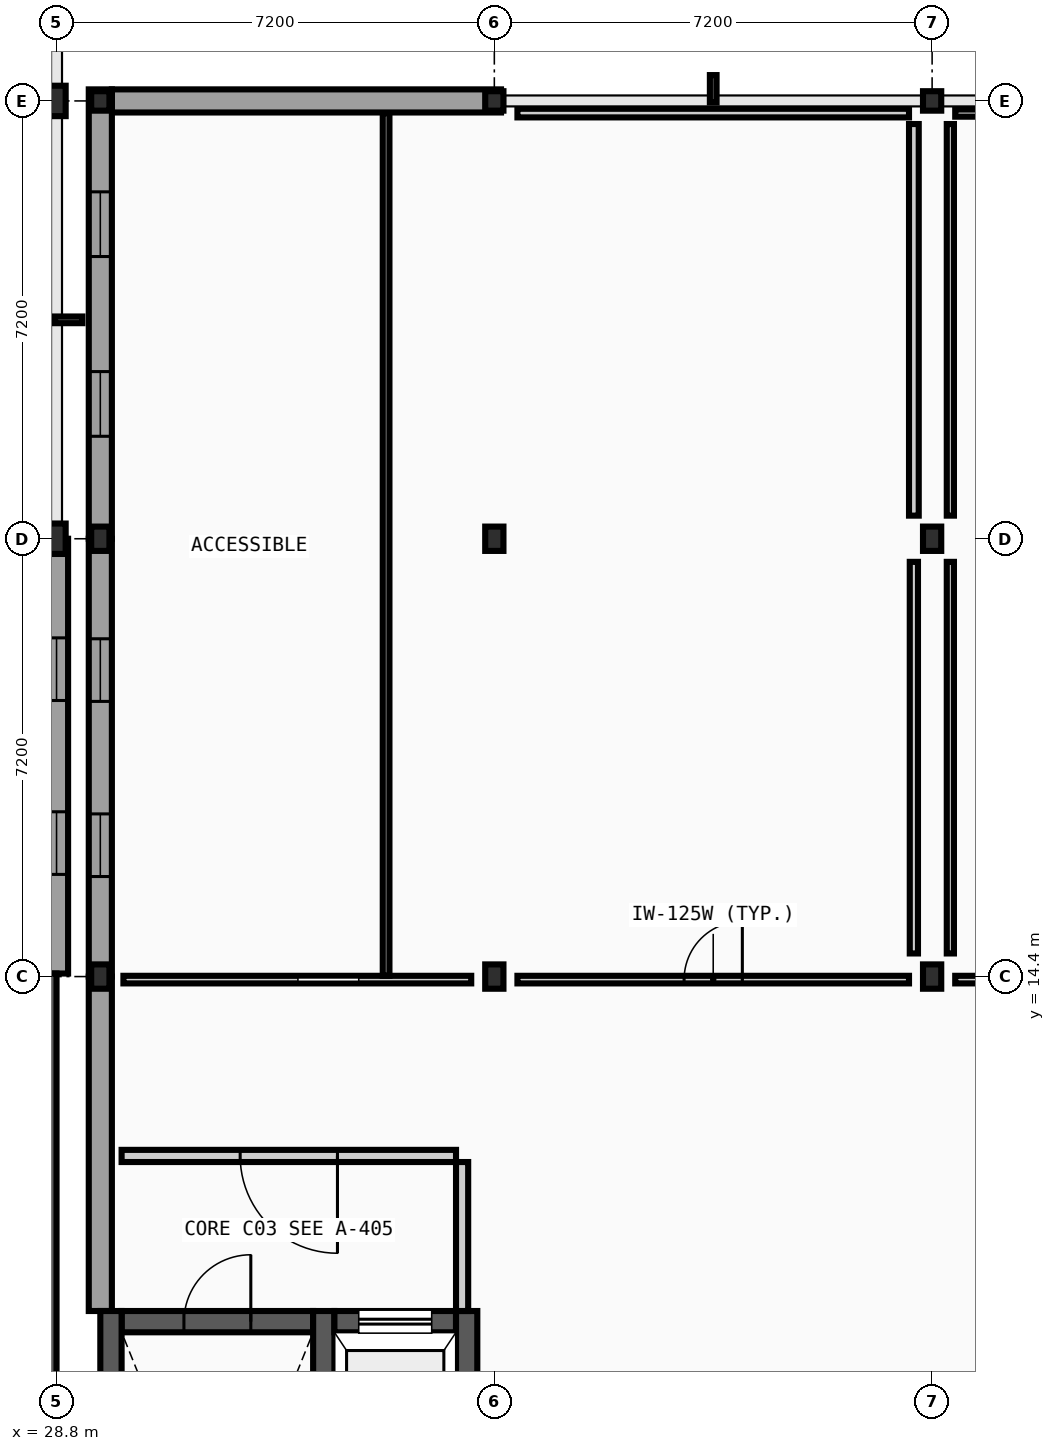
"""IFC4 building model, lengths in metres.
Left out: names, types, materials, properties, quantities, classifications, styles, units other than length and angle.
Written with IfcOpenShell. Run it as: python <this file> out.ifc"""

import sys

from ifc_helpers import new_model, si_unit, direction, frame, frame_2d, origin, origin_2d, place, context, subcontext, project, spatial, rectangle, i_section, extrude, element, fill, save


model = new_model("IFC4")
c1 = context("Model", 3, precision=1e-05, world=origin(), true_north=direction((0.0, 1.0)))
c2 = subcontext(c1, "Body", "Model", "MODEL_VIEW")
j1 = project(units=[si_unit("LENGTHUNIT", "METRE"), si_unit("PLANEANGLEUNIT", "RADIAN")], contexts=[c1])
p1 = place(None, origin())
s1 = spatial("IfcSite", under=j1, at=p1, CompositionType="ELEMENT")
p2 = place(p1, origin())
s2 = spatial("IfcBuilding", under=s1, at=p2, CompositionType="ELEMENT")
p3 = place(p2, frame((0.0, 0.0, 5.2)))
s3 = spatial("IfcBuildingStorey", under=s2, at=p3, CompositionType="ELEMENT", Elevation=5.2)
for number, where, z_axis, x_axis in (
    (1, (28.8, 21.6, 0.0), (0.0, 0.0, 1.0), (1.0, 0.0, 0.0)),
    (2, (28.8, 28.8, 0.0), (0.0, 0.0, 1.0), (1.0, 0.0, 0.0)),
):
    element("IfcColumn", number, at=place(p3, frame(where, z_axis=z_axis, x_axis=x_axis)), inside=s3, PredefinedType="COLUMN", context=c2, shape_type="SweptSolid", body=[
        extrude(i_section(OverallWidth=0.3, OverallDepth=0.5, WebThickness=0.014, FlangeThickness=0.028, FilletRadius=0.027, at=origin_2d()), origin(), (0.0, 0.0, 1.0), 4.4),
    ])
for number, where, z_axis, x_axis in (
    (3, (29.52, 14.4, 0.0), (0.0, 0.0, 1.0), (1.0, 0.0, 0.0)),
    (4, (29.52, 21.6, 0.0), (0.0, 0.0, 1.0), (1.0, 0.0, 0.0)),
):
    element("IfcColumn", number, at=place(p3, frame(where, z_axis=z_axis, x_axis=x_axis)), inside=s3, PredefinedType="COLUMN", context=c2, shape_type="SweptSolid", body=[
        extrude(i_section(OverallWidth=0.3, OverallDepth=0.4, WebThickness=0.013, FlangeThickness=0.024, FilletRadius=0.027, at=origin_2d()), origin(), (0.0, 0.0, 1.0), 4.4),
    ])
p4 = place(p3, frame((29.52, 28.8, 0.0), z_axis=(0.0, 0.0, 1.0), x_axis=(1.0, 0.0, 0.0)))
e5 = element("IfcColumn", 5, at=p4, inside=s3, PredefinedType="COLUMN", context=c2, shape_type="SweptSolid", body=[
    extrude(i_section(OverallWidth=0.3, OverallDepth=0.32, WebThickness=0.011, FlangeThickness=0.021, FilletRadius=0.027, at=origin_2d()), origin(), (0.0, 0.0, 1.0), 4.4),
])
for number, where, z_axis, x_axis in (
    (6, (36.0, 14.4, 0.0), (0.0, 0.0, 1.0), (1.0, 0.0, 0.0)),
    (7, (36.0, 21.6, 0.0), (0.0, 0.0, 1.0), (1.0, 0.0, 0.0)),
):
    element("IfcColumn", number, at=place(p3, frame(where, z_axis=z_axis, x_axis=x_axis)), inside=s3, PredefinedType="COLUMN", context=c2, shape_type="SweptSolid", body=[
        extrude(i_section(OverallWidth=0.3, OverallDepth=0.4, WebThickness=0.013, FlangeThickness=0.024, FilletRadius=0.027, at=origin_2d()), origin(), (0.0, 0.0, 1.0), 4.4),
    ])
p5 = place(p3, frame((36.0, 28.8, 0.0), z_axis=(0.0, 0.0, 1.0), x_axis=(1.0, 0.0, 0.0)))
e8 = element("IfcColumn", 8, at=p5, inside=s3, PredefinedType="COLUMN", context=c2, shape_type="SweptSolid", body=[
    extrude(i_section(OverallWidth=0.3, OverallDepth=0.32, WebThickness=0.011, FlangeThickness=0.021, FilletRadius=0.027, at=origin_2d()), origin(), (0.0, 0.0, 1.0), 4.4),
])
for number, where, z_axis, x_axis in (
    (9, (43.2, 14.4, 0.0), (0.0, 0.0, 1.0), (1.0, 0.0, 0.0)),
    (10, (43.2, 21.6, 0.0), (0.0, 0.0, 1.0), (1.0, 0.0, 0.0)),
):
    element("IfcColumn", number, at=place(p3, frame(where, z_axis=z_axis, x_axis=x_axis)), inside=s3, PredefinedType="COLUMN", context=c2, shape_type="SweptSolid", body=[
        extrude(i_section(OverallWidth=0.3, OverallDepth=0.4, WebThickness=0.013, FlangeThickness=0.024, FilletRadius=0.027, at=origin_2d()), origin(), (0.0, 0.0, 1.0), 4.4),
    ])
p6 = place(p3, frame((43.2, 28.8, 0.0), z_axis=(0.0, 0.0, 1.0), x_axis=(1.0, 0.0, 0.0)))
e11 = element("IfcColumn", 11, at=p6, inside=s3, PredefinedType="COLUMN", context=c2, shape_type="SweptSolid", body=[
    extrude(i_section(OverallWidth=0.3, OverallDepth=0.32, WebThickness=0.011, FlangeThickness=0.021, FilletRadius=0.027, at=origin_2d()), origin(), (0.0, 0.0, 1.0), 4.4),
])
p7 = place(p3, frame((28.8, 14.45, 0.0), z_axis=(0.0, 0.0, 1.0), x_axis=(0.0, 1.0, 0.0)))
e12 = element("IfcWall", 12, at=p7, inside=s3, PredefinedType="STANDARD", context=c2, shape_type="SweptSolid", body=[
    extrude(rectangle(XDim=7.15, YDim=0.38, at=frame_2d((3.575, 0.0))), origin(), (0.0, 0.0, 1.0), 4.185),
])
p8 = place(p7, frame((1.63, 0.0, 0.95)))
e13 = element("IfcOpeningElement", 13, at=p8, cuts=e12, PredefinedType="OPENING", context=c2, shape_type="SweptSolid", body=[
    extrude(rectangle(XDim=1.03, YDim=1.296, at=frame_2d((0.515, 0.648))), frame((0.0, 0.2, 0.0), z_axis=(0.0, -1.0, 0.0), x_axis=(1.0, 0.0, 0.0)), (0.0, 0.0, 1.0), 0.4),
])
p9 = place(p7, frame((4.49, 0.0, 0.95)))
e14 = element("IfcOpeningElement", 14, at=p9, cuts=e12, PredefinedType="OPENING", context=c2, shape_type="SweptSolid", body=[
    extrude(rectangle(XDim=1.03, YDim=1.296, at=frame_2d((0.515, 0.648))), frame((0.0, 0.2, 0.0), z_axis=(0.0, -1.0, 0.0), x_axis=(1.0, 0.0, 0.0)), (0.0, 0.0, 1.0), 0.4),
])
p10 = place(p3, frame((36.11, 28.8, 0.0), z_axis=(0.0, 0.0, 1.0), x_axis=(-1.0, 0.0, 0.0)))
e15 = element("IfcWall", 15, at=p10, inside=s3, PredefinedType="STANDARD", context=c2, shape_type="SweptSolid", body=[
    extrude(rectangle(XDim=6.4, YDim=0.38, at=frame_2d((3.2, 0.0))), origin(), (0.0, 0.0, 1.0), 3.88),
])
p11 = place(p3, frame((29.52, 14.4, 0.0), z_axis=(0.0, 0.0, 1.0), x_axis=(0.0, -1.0, 0.0)))
e16 = element("IfcWall", 16, at=p11, inside=s3, PredefinedType="STANDARD", context=c2, shape_type="SweptSolid", body=[
    extrude(rectangle(XDim=5.5, YDim=0.38, at=frame_2d((2.75, 0.0))), origin(), (0.0, 0.0, 1.0), 4.185),
])
p12 = place(p3, frame((29.52, 21.6, 0.0), z_axis=(0.0, 0.0, 1.0), x_axis=(0.0, -1.0, 0.0)))
e17 = element("IfcWall", 17, at=p12, inside=s3, PredefinedType="STANDARD", context=c2, shape_type="SweptSolid", body=[
    extrude(rectangle(XDim=7.2, YDim=0.38, at=frame_2d((3.6, 0.0))), origin(), (0.0, 0.0, 1.0), 3.88),
])
p13 = place(p12, frame((1.645, 0.0, 0.95)))
e18 = element("IfcOpeningElement", 18, at=p13, cuts=e17, PredefinedType="OPENING", context=c2, shape_type="SweptSolid", body=[
    extrude(rectangle(XDim=1.03, YDim=1.332, at=frame_2d((0.515, 0.666))), frame((0.0, 0.2, 0.0), z_axis=(0.0, -1.0, 0.0), x_axis=(1.0, 0.0, 0.0)), (0.0, 0.0, 1.0), 0.4),
])
p14 = place(p12, frame((4.525, 0.0, 0.95)))
e19 = element("IfcOpeningElement", 19, at=p14, cuts=e17, PredefinedType="OPENING", context=c2, shape_type="SweptSolid", body=[
    extrude(rectangle(XDim=1.03, YDim=1.332, at=frame_2d((0.515, 0.666))), frame((0.0, 0.2, 0.0), z_axis=(0.0, -1.0, 0.0), x_axis=(1.0, 0.0, 0.0)), (0.0, 0.0, 1.0), 0.4),
])
p15 = place(p3, frame((29.52, 28.99, 0.0), z_axis=(0.0, 0.0, 1.0), x_axis=(0.0, -1.0, 0.0)))
e20 = element("IfcWall", 20, at=p15, inside=s3, PredefinedType="STANDARD", context=c2, shape_type="SweptSolid", body=[
    extrude(rectangle(XDim=7.39, YDim=0.38, at=frame_2d((3.695, 0.0))), origin(), (0.0, 0.0, 1.0), 3.88),
])
p16 = place(p15, frame((1.685, 0.0, 0.95)))
e21 = element("IfcOpeningElement", 21, at=p16, cuts=e20, PredefinedType="OPENING", context=c2, shape_type="SweptSolid", body=[
    extrude(rectangle(XDim=1.064, YDim=1.332, at=frame_2d((0.532, 0.666))), frame((0.0, 0.2, 0.0), z_axis=(0.0, -1.0, 0.0), x_axis=(1.0, 0.0, 0.0)), (0.0, 0.0, 1.0), 0.4),
])
p17 = place(p15, frame((4.641, 0.0, 0.95)))
e22 = element("IfcOpeningElement", 22, at=p17, cuts=e20, PredefinedType="OPENING", context=c2, shape_type="SweptSolid", body=[
    extrude(rectangle(XDim=1.064, YDim=1.332, at=frame_2d((0.532, 0.666))), frame((0.0, 0.2, 0.0), z_axis=(0.0, -1.0, 0.0), x_axis=(1.0, 0.0, 0.0)), (0.0, 0.0, 1.0), 0.4),
])
p18 = place(p3, frame((28.6, 5.85, 0.0), z_axis=(0.0, 0.0, 1.0), x_axis=(0.0, 1.0, 0.0)))
e23 = element("IfcWall", 23, at=p18, inside=s3, PredefinedType="SHEAR", context=c2, shape_type="SweptSolid", body=[
    extrude(rectangle(XDim=8.6, YDim=0.4, at=frame_2d((4.3, 0.0))), origin(), (0.0, 0.0, 1.0), 4.185),
])
p19 = place(p3, frame((29.87, 8.725, 0.0), z_axis=(0.0, 0.0, 1.0), x_axis=(1.0, 0.0, 0.0)))
e24 = element("IfcWall", 24, at=p19, inside=s3, PredefinedType="SHEAR", context=c2, shape_type="SweptSolid", body=[
    extrude(rectangle(XDim=3.15, YDim=0.35, at=frame_2d((1.575, 0.0))), origin(), (0.0, 0.0, 1.0), 4.185),
])
p20 = place(p19, frame((1.025, 0.0, 0.0)))
e25 = element("IfcOpeningElement", 25, at=p20, cuts=e24, PredefinedType="OPENING", context=c2, shape_type="SweptSolid", body=[
    extrude(rectangle(XDim=1.1, YDim=2.15, at=frame_2d((0.55, 1.075))), frame((0.0, 0.185, 0.0), z_axis=(0.0, -1.0, 0.0), x_axis=(1.0, 0.0, 0.0)), (0.0, 0.0, 1.0), 0.37),
])
for number, where, z_axis, x_axis in (
    (26, (29.695, 0.4, 0.0), (0.0, 0.0, 1.0), (0.0, 1.0, 0.0)),
    (27, (33.195, 0.4, 0.0), (0.0, 0.0, 1.0), (0.0, 1.0, 0.0)),
):
    element("IfcWall", number, at=place(p3, frame(where, z_axis=z_axis, x_axis=x_axis)), inside=s3, PredefinedType="SHEAR", context=c2, shape_type="SweptSolid", body=[
        extrude(rectangle(XDim=8.5, YDim=0.35, at=frame_2d((4.25, 0.0))), origin(), (0.0, 0.0, 1.0), 4.185),
    ])
p21 = place(p3, frame((33.37, 8.725, 0.0), z_axis=(0.0, 0.0, 1.0), x_axis=(1.0, 0.0, 0.0)))
e28 = element("IfcWall", 28, at=p21, inside=s3, PredefinedType="SHEAR", context=c2, shape_type="SweptSolid", body=[
    extrude(rectangle(XDim=2.0, YDim=0.35, at=frame_2d((1.0, 0.0))), origin(), (0.0, 0.0, 1.0), 4.185),
])
p22 = place(p21, frame((0.4, 0.0, 0.0)))
e29 = element("IfcOpeningElement", 29, at=p22, cuts=e28, PredefinedType="OPENING", context=c2, shape_type="SweptSolid", body=[
    extrude(rectangle(XDim=1.2, YDim=2.2, at=frame_2d((0.6, 1.1))), frame((0.0, 0.185, 0.0), z_axis=(0.0, -1.0, 0.0), x_axis=(1.0, 0.0, 0.0)), (0.0, 0.0, 1.0), 0.37),
])
p23 = place(p3, frame((35.545, 5.2, 0.0), z_axis=(0.0, 0.0, 1.0), x_axis=(0.0, 1.0, 0.0)))
e30 = element("IfcWall", 30, at=p23, inside=s3, PredefinedType="SHEAR", context=c2, shape_type="SweptSolid", body=[
    extrude(rectangle(XDim=3.7, YDim=0.35, at=frame_2d((1.85, 0.0))), origin(), (0.0, 0.0, 1.0), 4.185),
])
p24 = place(p3, frame((29.87, 11.45, 0.0), z_axis=(0.0, 0.0, 1.0), x_axis=(1.0, 0.0, 0.0)))
e31 = element("IfcWall", 31, at=p24, inside=s3, PredefinedType="PARTITIONING", context=c2, shape_type="SweptSolid", body=[
    extrude(rectangle(XDim=5.5, YDim=0.2, at=frame_2d((2.75, 0.0))), origin(), (0.0, 0.0, 1.0), 4.185),
])
p25 = place(p24, frame((1.95, 0.0, 0.0)))
e32 = element("IfcOpeningElement", 32, at=p25, cuts=e31, PredefinedType="OPENING", context=c2, shape_type="SweptSolid", body=[
    extrude(rectangle(XDim=1.6, YDim=2.2, at=frame_2d((0.8, 1.1))), frame((0.0, 0.11, 0.0), z_axis=(0.0, -1.0, 0.0), x_axis=(1.0, 0.0, 0.0)), (0.0, 0.0, 1.0), 0.22),
])
p26 = place(p3, frame((35.47, 8.9, 0.0), z_axis=(0.0, 0.0, 1.0), x_axis=(0.0, 1.0, 0.0)))
e33 = element("IfcWall", 33, at=p26, inside=s3, PredefinedType="PARTITIONING", context=c2, shape_type="SweptSolid", body=[
    extrude(rectangle(XDim=2.45, YDim=0.2, at=frame_2d((1.225, 0.0))), origin(), (0.0, 0.0, 1.0), 4.185),
])
p27 = place(p3, frame((29.9, 14.35, 0.0), z_axis=(0.0, 0.0, 1.0), x_axis=(1.0, 0.0, 0.0)))
e34 = element("IfcWall", 34, at=p27, inside=s3, PredefinedType="PARTITIONING", context=c2, shape_type="SweptSolid", body=[
    extrude(rectangle(XDim=5.72, YDim=0.125, at=frame_2d((2.86, 0.0))), origin(), (0.0, 0.0, 1.0), 3.88),
])
p28 = place(p27, frame((2.87, 0.0, 0.0)))
e35 = element("IfcOpeningElement", 35, at=p28, cuts=e34, PredefinedType="OPENING", context=c2, shape_type="SweptSolid", body=[
    extrude(rectangle(XDim=1.0, YDim=2.1, at=frame_2d((0.5, 1.05))), frame((0.0, 0.073, 0.0), z_axis=(0.0, -1.0, 0.0), x_axis=(1.0, 0.0, 0.0)), (0.0, 0.0, 1.0), 0.145),
])
p29 = place(p3, frame((36.38, 14.35, 0.0), z_axis=(0.0, 0.0, 1.0), x_axis=(1.0, 0.0, 0.0)))
e36 = element("IfcWall", 36, at=p29, inside=s3, PredefinedType="PARTITIONING", context=c2, shape_type="SweptSolid", body=[
    extrude(rectangle(XDim=6.44, YDim=0.125, at=frame_2d((3.22, 0.0))), origin(), (0.0, 0.0, 1.0), 3.88),
])
p30 = place(p29, frame((2.741, 0.0, 0.0)))
e37 = element("IfcOpeningElement", 37, at=p30, cuts=e36, PredefinedType="OPENING", context=c2, shape_type="SweptSolid", body=[
    extrude(rectangle(XDim=0.958, YDim=2.124, at=frame_2d((0.479, 1.062))), frame((0.0, 0.073, 0.0), z_axis=(0.0, -1.0, 0.0), x_axis=(1.0, 0.0, 0.0)), (0.0, 0.0, 1.0), 0.145),
])
p31 = place(p3, frame((43.58, 14.35, 0.0), z_axis=(0.0, 0.0, 1.0), x_axis=(1.0, 0.0, 0.0)))
e38 = element("IfcWall", 38, at=p31, inside=s3, PredefinedType="PARTITIONING", context=c2, shape_type="SweptSolid", body=[
    extrude(rectangle(XDim=6.44, YDim=0.125, at=frame_2d((3.22, 0.0))), origin(), (0.0, 0.0, 1.0), 3.88),
])
p32 = place(p31, frame((2.645, 0.0, 0.0)))
e39 = element("IfcOpeningElement", 39, at=p32, cuts=e38, PredefinedType="OPENING", context=c2, shape_type="SweptSolid", body=[
    extrude(rectangle(XDim=1.15, YDim=2.15, at=frame_2d((0.575, 1.075))), frame((0.0, 0.073, 0.0), z_axis=(0.0, -1.0, 0.0), x_axis=(1.0, 0.0, 0.0)), (0.0, 0.0, 1.0), 0.145),
])
p33 = place(p3, frame((36.38, 28.6, 0.0), z_axis=(0.0, 0.0, 1.0), x_axis=(1.0, 0.0, 0.0)))
e40 = element("IfcWall", 40, at=p33, inside=s3, PredefinedType="PARTITIONING", context=c2, shape_type="SweptSolid", body=[
    extrude(rectangle(XDim=6.44, YDim=0.142, at=frame_2d((3.22, 0.0))), origin(), (0.0, 0.0, 1.0), 3.88),
])
p34 = place(p3, frame((43.58, 28.6, 0.0), z_axis=(0.0, 0.0, 1.0), x_axis=(1.0, 0.0, 0.0)))
e41 = element("IfcWall", 41, at=p34, inside=s3, PredefinedType="PARTITIONING", context=c2, shape_type="SweptSolid", body=[
    extrude(rectangle(XDim=6.44, YDim=0.118, at=frame_2d((3.22, 0.0))), origin(), (0.0, 0.0, 1.0), 3.88),
])
p35 = place(p3, frame((34.22, 14.413, 0.0), z_axis=(0.0, 0.0, 1.0), x_axis=(0.0, 1.0, 0.0)))
e42 = element("IfcWall", 42, at=p35, inside=s3, PredefinedType="PARTITIONING", context=c2, shape_type="SweptSolid", body=[
    extrude(rectangle(XDim=14.188, YDim=0.11, at=frame_2d((7.094, 0.0))), origin(), (0.0, 0.0, 1.0), 4.185),
])
p36 = place(p3, frame((42.9, 14.78, 0.0), z_axis=(0.0, 0.0, 1.0), x_axis=(0.0, 1.0, 0.0)))
e43 = element("IfcWall", 43, at=p36, inside=s3, PredefinedType="PARTITIONING", context=c2, shape_type="SweptSolid", body=[
    extrude(rectangle(XDim=6.44, YDim=0.135, at=frame_2d((3.22, 0.0))), origin(), (0.0, 0.0, 1.0), 4.185),
])
p37 = place(p3, frame((42.9, 21.98, 0.0), z_axis=(0.0, 0.0, 1.0), x_axis=(0.0, 1.0, 0.0)))
e44 = element("IfcWall", 44, at=p37, inside=s3, PredefinedType="PARTITIONING", context=c2, shape_type="SweptSolid", body=[
    extrude(rectangle(XDim=6.44, YDim=0.16, at=frame_2d((3.22, 0.0))), origin(), (0.0, 0.0, 1.0), 3.88),
])
for number, where, z_axis, x_axis in (
    (45, (43.5, 14.78, 0.0), (0.0, 0.0, 1.0), (0.0, 1.0, 0.0)),
    (46, (43.5, 21.98, 0.0), (0.0, 0.0, 1.0), (0.0, 1.0, 0.0)),
):
    element("IfcWall", number, at=place(p3, frame(where, z_axis=z_axis, x_axis=x_axis)), inside=s3, PredefinedType="PARTITIONING", context=c2, shape_type="SweptSolid", body=[
        extrude(rectangle(XDim=6.44, YDim=0.118, at=frame_2d((3.22, 0.0))), origin(), (0.0, 0.0, 1.0), 4.185),
    ])
p38 = place(p8, origin())
e47 = element("IfcWindow", 47, at=p38, inside=s3, PartitioningType="SINGLE_PANEL", PredefinedType="WINDOW", context=c2, shape_type="SweptSolid", body=[
    extrude(rectangle(XDim=1.03, YDim=1.296, at=frame_2d((0.515, 0.648))), frame((0.0, 0.03, 0.0), z_axis=(0.0, -1.0, 0.0), x_axis=(1.0, 0.0, 0.0)), (0.0, 0.0, 1.0), 0.06),
])
fill(e13, e47)
p39 = place(p9, origin())
e48 = element("IfcWindow", 48, at=p39, inside=s3, PartitioningType="SINGLE_PANEL", PredefinedType="WINDOW", context=c2, shape_type="SweptSolid", body=[
    extrude(rectangle(XDim=1.03, YDim=1.296, at=frame_2d((0.515, 0.648))), frame((0.0, 0.03, 0.0), z_axis=(0.0, -1.0, 0.0), x_axis=(1.0, 0.0, 0.0)), (0.0, 0.0, 1.0), 0.06),
])
fill(e14, e48)
p40 = place(p13, origin())
e49 = element("IfcWindow", 49, at=p40, inside=s3, PartitioningType="SINGLE_PANEL", PredefinedType="WINDOW", context=c2, shape_type="SweptSolid", body=[
    extrude(rectangle(XDim=1.03, YDim=1.332, at=frame_2d((0.515, 0.666))), frame((0.0, 0.03, 0.0), z_axis=(0.0, -1.0, 0.0), x_axis=(1.0, 0.0, 0.0)), (0.0, 0.0, 1.0), 0.06),
])
fill(e18, e49)
p41 = place(p14, origin())
e50 = element("IfcWindow", 50, at=p41, inside=s3, PartitioningType="SINGLE_PANEL", PredefinedType="WINDOW", context=c2, shape_type="SweptSolid", body=[
    extrude(rectangle(XDim=1.03, YDim=1.332, at=frame_2d((0.515, 0.666))), frame((0.0, 0.03, 0.0), z_axis=(0.0, -1.0, 0.0), x_axis=(1.0, 0.0, 0.0)), (0.0, 0.0, 1.0), 0.06),
])
fill(e19, e50)
p42 = place(p16, origin())
e51 = element("IfcWindow", 51, at=p42, inside=s3, PartitioningType="SINGLE_PANEL", PredefinedType="WINDOW", context=c2, shape_type="SweptSolid", body=[
    extrude(rectangle(XDim=1.064, YDim=1.332, at=frame_2d((0.532, 0.666))), frame((0.0, 0.03, 0.0), z_axis=(0.0, -1.0, 0.0), x_axis=(1.0, 0.0, 0.0)), (0.0, 0.0, 1.0), 0.06),
])
fill(e21, e51)
p43 = place(p17, origin())
e52 = element("IfcWindow", 52, at=p43, inside=s3, PartitioningType="SINGLE_PANEL", PredefinedType="WINDOW", context=c2, shape_type="SweptSolid", body=[
    extrude(rectangle(XDim=1.064, YDim=1.332, at=frame_2d((0.532, 0.666))), frame((0.0, 0.03, 0.0), z_axis=(0.0, -1.0, 0.0), x_axis=(1.0, 0.0, 0.0)), (0.0, 0.0, 1.0), 0.06),
])
fill(e22, e52)
p44 = place(p20, frame((1.1, 0.0, 0.0), z_axis=(0.0, 0.0, 1.0), x_axis=(-1.0, 0.0, 0.0)))
e53 = element("IfcDoor", 53, at=p44, inside=s3, OperationType="SINGLE_SWING_RIGHT", PredefinedType="DOOR", context=c2, shape_type="SweptSolid", body=[
    extrude(rectangle(XDim=1.1, YDim=2.15, at=frame_2d((0.55, 1.075))), frame((0.0, 0.025, 0.0), z_axis=(0.0, -1.0, 0.0), x_axis=(1.0, 0.0, 0.0)), (0.0, 0.0, 1.0), 0.05),
])
fill(e25, e53)
p45 = place(p22, origin())
e54 = element("IfcDoor", 54, at=p45, inside=s3, OperationType="SLIDING_TO_RIGHT", PredefinedType="DOOR", context=c2, shape_type="SweptSolid", body=[
    extrude(rectangle(XDim=1.2, YDim=2.2, at=frame_2d((0.6, 1.1))), frame((0.0, 0.025, 0.0), z_axis=(0.0, -1.0, 0.0), x_axis=(1.0, 0.0, 0.0)), (0.0, 0.0, 1.0), 0.05),
])
fill(e29, e54)
p46 = place(p25, origin())
e55 = element("IfcDoor", 55, at=p46, inside=s3, OperationType="DOUBLE_DOOR_SINGLE_SWING", PredefinedType="DOOR", context=c2, shape_type="SweptSolid", body=[
    extrude(rectangle(XDim=1.6, YDim=2.2, at=frame_2d((0.8, 1.1))), frame((0.0, 0.025, 0.0), z_axis=(0.0, -1.0, 0.0), x_axis=(1.0, 0.0, 0.0)), (0.0, 0.0, 1.0), 0.05),
])
fill(e32, e55)
p47 = place(p28, frame((1.0, 0.0, 0.0), z_axis=(0.0, 0.0, 1.0), x_axis=(-1.0, 0.0, 0.0)))
e56 = element("IfcDoor", 56, at=p47, inside=s3, OperationType="SLIDING_TO_LEFT", PredefinedType="DOOR", context=c2, shape_type="SweptSolid", body=[
    extrude(rectangle(XDim=1.0, YDim=2.1, at=frame_2d((0.5, 1.05))), frame((0.0, 0.025, 0.0), z_axis=(0.0, -1.0, 0.0), x_axis=(1.0, 0.0, 0.0)), (0.0, 0.0, 1.0), 0.05),
])
fill(e35, e56)
p48 = place(p30, frame((0.958, 0.0, 0.0), z_axis=(0.0, 0.0, 1.0), x_axis=(-1.0, 0.0, 0.0)))
e57 = element("IfcDoor", 57, at=p48, inside=s3, OperationType="SINGLE_SWING_RIGHT", PredefinedType="DOOR", context=c2, shape_type="SweptSolid", body=[
    extrude(rectangle(XDim=0.958, YDim=2.124, at=frame_2d((0.479, 1.062))), frame((0.0, 0.025, 0.0), z_axis=(0.0, -1.0, 0.0), x_axis=(1.0, 0.0, 0.0)), (0.0, 0.0, 1.0), 0.05),
])
fill(e37, e57)
save(model, sys.argv[1])
